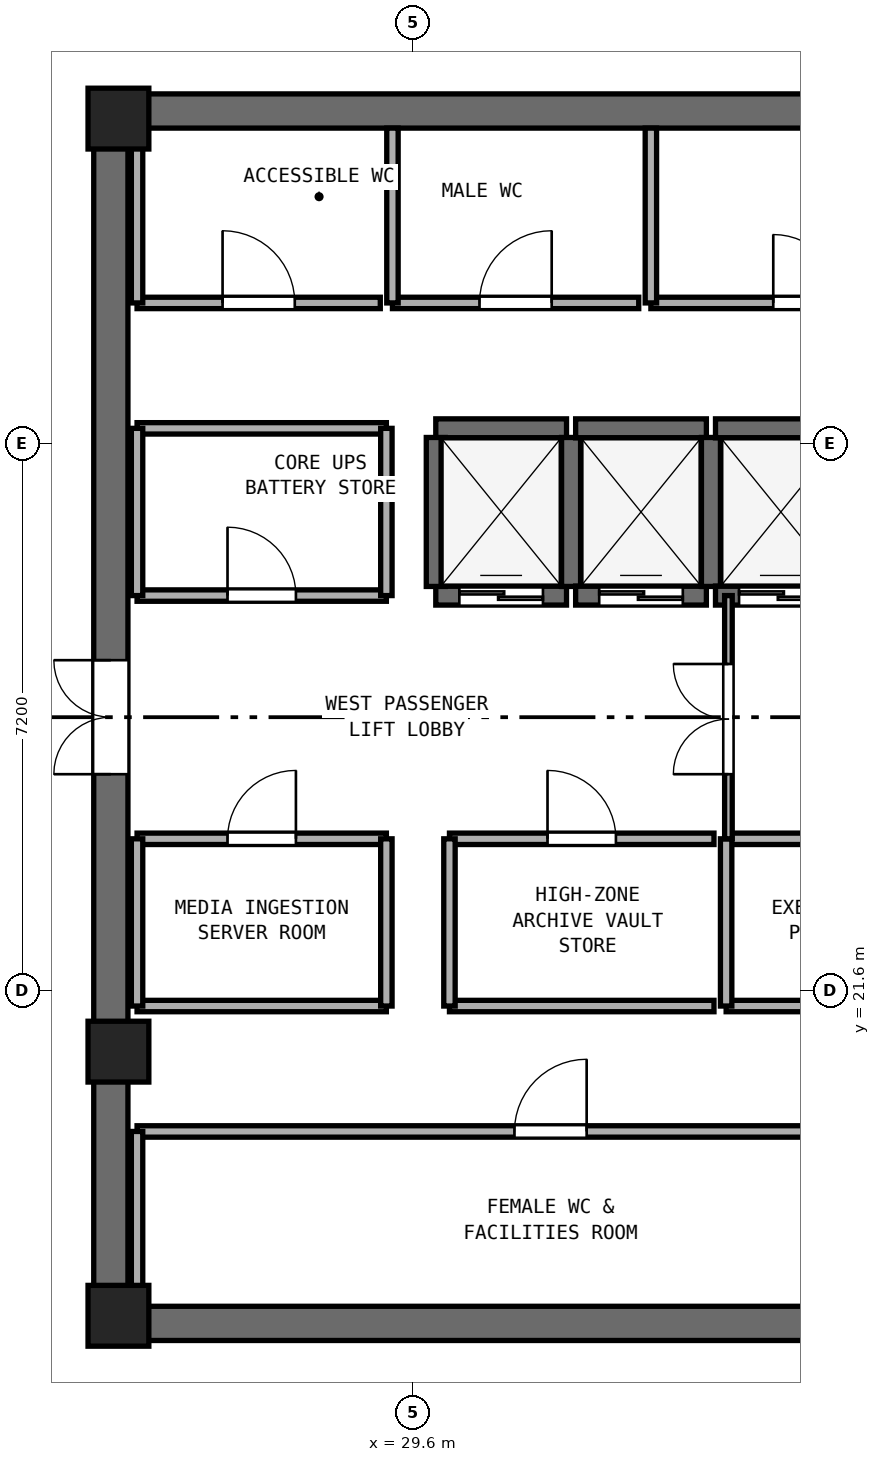
"""IFC4 building model, lengths in metres.
Left out: names, types, materials, properties, quantities, classifications, styles, units other than length and angle.
Written with IfcOpenShell. Run it as: python <this file> out.ifc"""

import sys

from ifc_helpers import new_model, si_unit, direction, frame, frame_2d, origin, origin_2d, place, context, subcontext, project, spatial, rectangle, extrude, element, fill, save


model = new_model("IFC4")
c1 = context("Model", 3, precision=1e-05, world=origin(), true_north=direction((0.0, 1.0)))
c2 = subcontext(c1, "Body", "Model", "MODEL_VIEW")
j1 = project(units=[si_unit("LENGTHUNIT", "METRE"), si_unit("PLANEANGLEUNIT", "RADIAN")], contexts=[c1])
p1 = place(None, origin())
s1 = spatial("IfcSite", under=j1, at=p1, CompositionType="ELEMENT")
p2 = place(p1, origin())
s2 = spatial("IfcBuilding", under=s1, at=p2, CompositionType="ELEMENT")
p3 = place(p2, frame((0.0, 0.0, 266.8)))
s3 = spatial("IfcBuildingStorey", under=s2, at=p3, CompositionType="ELEMENT", Elevation=266.8)
for number, where, z_axis, x_axis in (
    (1, (25.4, 17.225, 0.0), (0.0, 0.0, 1.0), (1.0, 0.0, 0.0)),
    (2, (25.4, 33.175, 0.0), (0.0, 0.0, 1.0), (1.0, 0.0, 0.0)),
):
    element("IfcWall", number, at=place(p3, frame(where, z_axis=z_axis, x_axis=x_axis)), inside=s3, PredefinedType="SHEAR", context=c2, shape_type="SweptSolid", body=[
        extrude(rectangle(XDim=23.2, YDim=0.45, at=frame_2d((11.6, 0.0))), origin(), (0.0, 0.0, 1.0), 3.51),
    ])
p4 = place(p3, frame((25.625, 17.45, 0.0), z_axis=(0.0, 0.0, 1.0), x_axis=(0.0, 1.0, 0.0)))
e3 = element("IfcWall", 3, at=p4, inside=s3, PredefinedType="SHEAR", context=c2, shape_type="SweptSolid", body=[
    extrude(rectangle(XDim=15.5, YDim=0.45, at=frame_2d((7.75, 0.0))), origin(), (0.0, 0.0, 1.0), 3.51),
])
p5 = place(p4, frame((7.0, 0.0, 0.0)))
e4 = element("IfcOpeningElement", 4, at=p5, cuts=e3, PredefinedType="OPENING", context=c2, shape_type="SweptSolid", body=[
    extrude(rectangle(XDim=1.5, YDim=2.15, at=frame_2d((0.75, 1.075))), frame((0.0, 0.235, 0.0), z_axis=(0.0, -1.0, 0.0), x_axis=(1.0, 0.0, 0.0)), (0.0, 0.0, 1.0), 0.47),
])
for number, where, z_axis, x_axis in (
    (5, (25.725, 17.325, 0.0), (0.0, 0.0, 1.0), (1.0, 0.0, 0.0)),
    (6, (25.725, 33.075, 0.0), (0.0, 0.0, 1.0), (1.0, 0.0, 0.0)),
    (7, (25.725, 20.8, 0.0), (0.0, 0.0, 1.0), (1.0, 0.0, 0.0)),
):
    element("IfcColumn", number, at=place(p3, frame(where, z_axis=z_axis, x_axis=x_axis)), inside=s3, PredefinedType="PILASTER", context=c2, shape_type="SweptSolid", body=[
        extrude(rectangle(XDim=0.8, YDim=0.8, at=origin_2d()), origin(), (0.0, 0.0, 1.0), 3.8),
    ])
p6 = place(p3, frame((29.9, 26.8, 0.0), z_axis=(0.0, 0.0, 1.0), x_axis=(1.0, 0.0, 0.0)))
e8 = element("IfcWall", 8, at=p6, inside=s3, PredefinedType="SHEAR", context=c2, shape_type="SweptSolid", body=[
    extrude(rectangle(XDim=1.72, YDim=0.25, at=frame_2d((0.86, 0.0))), origin(), (0.0, 0.0, 1.0), 3.51),
])
p7 = place(p6, frame((0.31, 0.0, 0.0)))
e9 = element("IfcOpeningElement", 9, at=p7, cuts=e8, PredefinedType="OPENING", context=c2, shape_type="SweptSolid", body=[
    extrude(rectangle(XDim=1.1, YDim=2.15, at=frame_2d((0.55, 1.075))), frame((0.0, 0.135, 0.0), z_axis=(0.0, -1.0, 0.0), x_axis=(1.0, 0.0, 0.0)), (0.0, 0.0, 1.0), 0.27),
])
p8 = place(p3, frame((29.9, 29.0, 0.0), z_axis=(0.0, 0.0, 1.0), x_axis=(1.0, 0.0, 0.0)))
e10 = element("IfcWall", 10, at=p8, inside=s3, PredefinedType="SHEAR", context=c2, shape_type="SweptSolid", body=[
    extrude(rectangle(XDim=1.72, YDim=0.25, at=frame_2d((0.86, 0.0))), origin(), (0.0, 0.0, 1.0), 3.51),
])
for number, where, z_axis, x_axis in (
    (11, (29.9, 26.92, 0.0), (0.0, 0.0, 1.0), (0.0, 1.0, 0.0)),
    (12, (31.68, 26.92, 0.0), (0.0, 0.0, 1.0), (0.0, 1.0, 0.0)),
):
    element("IfcWall", number, at=place(p3, frame(where, z_axis=z_axis, x_axis=x_axis)), inside=s3, PredefinedType="SHEAR", context=c2, shape_type="SweptSolid", body=[
        extrude(rectangle(XDim=1.96, YDim=0.25, at=frame_2d((0.98, 0.0))), origin(), (0.0, 0.0, 1.0), 3.51),
    ])
p9 = place(p3, frame((31.74, 26.8, 0.0), z_axis=(0.0, 0.0, 1.0), x_axis=(1.0, 0.0, 0.0)))
e13 = element("IfcWall", 13, at=p9, inside=s3, PredefinedType="SHEAR", context=c2, shape_type="SweptSolid", body=[
    extrude(rectangle(XDim=1.72, YDim=0.25, at=frame_2d((0.86, 0.0))), origin(), (0.0, 0.0, 1.0), 3.51),
])
p10 = place(p9, frame((0.31, 0.0, 0.0)))
e14 = element("IfcOpeningElement", 14, at=p10, cuts=e13, PredefinedType="OPENING", context=c2, shape_type="SweptSolid", body=[
    extrude(rectangle(XDim=1.1, YDim=2.15, at=frame_2d((0.55, 1.075))), frame((0.0, 0.135, 0.0), z_axis=(0.0, -1.0, 0.0), x_axis=(1.0, 0.0, 0.0)), (0.0, 0.0, 1.0), 0.27),
])
p11 = place(p3, frame((31.74, 29.0, 0.0), z_axis=(0.0, 0.0, 1.0), x_axis=(1.0, 0.0, 0.0)))
e15 = element("IfcWall", 15, at=p11, inside=s3, PredefinedType="SHEAR", context=c2, shape_type="SweptSolid", body=[
    extrude(rectangle(XDim=1.72, YDim=0.25, at=frame_2d((0.86, 0.0))), origin(), (0.0, 0.0, 1.0), 3.51),
])
p12 = place(p3, frame((33.52, 26.92, 0.0), z_axis=(0.0, 0.0, 1.0), x_axis=(0.0, 1.0, 0.0)))
e16 = element("IfcWall", 16, at=p12, inside=s3, PredefinedType="SHEAR", context=c2, shape_type="SweptSolid", body=[
    extrude(rectangle(XDim=1.96, YDim=0.25, at=frame_2d((0.98, 0.0))), origin(), (0.0, 0.0, 1.0), 3.51),
])
p13 = place(p3, frame((33.58, 26.8, 0.0), z_axis=(0.0, 0.0, 1.0), x_axis=(1.0, 0.0, 0.0)))
e17 = element("IfcWall", 17, at=p13, inside=s3, PredefinedType="SHEAR", context=c2, shape_type="SweptSolid", body=[
    extrude(rectangle(XDim=1.72, YDim=0.25, at=frame_2d((0.86, 0.0))), origin(), (0.0, 0.0, 1.0), 3.51),
])
p14 = place(p13, frame((0.31, 0.0, 0.0)))
e18 = element("IfcOpeningElement", 18, at=p14, cuts=e17, PredefinedType="OPENING", context=c2, shape_type="SweptSolid", body=[
    extrude(rectangle(XDim=1.1, YDim=2.15, at=frame_2d((0.55, 1.075))), frame((0.0, 0.135, 0.0), z_axis=(0.0, -1.0, 0.0), x_axis=(1.0, 0.0, 0.0)), (0.0, 0.0, 1.0), 0.27),
])
p15 = place(p3, frame((33.58, 29.0, 0.0), z_axis=(0.0, 0.0, 1.0), x_axis=(1.0, 0.0, 0.0)))
e19 = element("IfcWall", 19, at=p15, inside=s3, PredefinedType="SHEAR", context=c2, shape_type="SweptSolid", body=[
    extrude(rectangle(XDim=1.72, YDim=0.25, at=frame_2d((0.86, 0.0))), origin(), (0.0, 0.0, 1.0), 3.51),
])
p16 = place(p3, frame((25.97, 30.65, 0.0), z_axis=(0.0, 0.0, 1.0), x_axis=(1.0, 0.0, 0.0)))
e20 = element("IfcWall", 20, at=p16, inside=s3, PredefinedType="PARTITIONING", context=c2, shape_type="SweptSolid", body=[
    extrude(rectangle(XDim=3.2, YDim=0.15, at=frame_2d((1.6, 0.0))), origin(), (0.0, 0.0, 1.0), 3.51),
])
p17 = place(p16, frame((1.125, 0.0, 0.0)))
e21 = element("IfcOpeningElement", 21, at=p17, cuts=e20, PredefinedType="OPENING", context=c2, shape_type="SweptSolid", body=[
    extrude(rectangle(XDim=0.95, YDim=2.1, at=frame_2d((0.475, 1.05))), frame((0.0, 0.085, 0.0), z_axis=(0.0, -1.0, 0.0), x_axis=(1.0, 0.0, 0.0)), (0.0, 0.0, 1.0), 0.17),
])
p18 = place(p3, frame((25.97, 30.65, 0.0), z_axis=(0.0, 0.0, 1.0), x_axis=(0.0, 1.0, 0.0)))
e22 = element("IfcWall", 22, at=p18, inside=s3, PredefinedType="PARTITIONING", context=c2, shape_type="SweptSolid", body=[
    extrude(rectangle(XDim=2.3, YDim=0.15, at=frame_2d((1.15, 0.0))), origin(), (0.0, 0.0, 1.0), 2.61),
])
p19 = place(p3, frame((29.33, 30.65, 0.0), z_axis=(0.0, 0.0, 1.0), x_axis=(1.0, 0.0, 0.0)))
e23 = element("IfcWall", 23, at=p19, inside=s3, PredefinedType="PARTITIONING", context=c2, shape_type="SweptSolid", body=[
    extrude(rectangle(XDim=3.24, YDim=0.15, at=frame_2d((1.62, 0.0))), origin(), (0.0, 0.0, 1.0), 3.51),
])
p20 = place(p19, frame((1.145, 0.0, 0.0)))
e24 = element("IfcOpeningElement", 24, at=p20, cuts=e23, PredefinedType="OPENING", context=c2, shape_type="SweptSolid", body=[
    extrude(rectangle(XDim=0.95, YDim=2.1, at=frame_2d((0.475, 1.05))), frame((0.0, 0.085, 0.0), z_axis=(0.0, -1.0, 0.0), x_axis=(1.0, 0.0, 0.0)), (0.0, 0.0, 1.0), 0.17),
])
p21 = place(p3, frame((29.33, 30.65, 0.0), z_axis=(0.0, 0.0, 1.0), x_axis=(0.0, 1.0, 0.0)))
e25 = element("IfcWall", 25, at=p21, inside=s3, PredefinedType="PARTITIONING", context=c2, shape_type="SweptSolid", body=[
    extrude(rectangle(XDim=2.3, YDim=0.15, at=frame_2d((1.15, 0.0))), origin(), (0.0, 0.0, 1.0), 3.51),
])
p22 = place(p3, frame((32.73, 30.65, 0.0), z_axis=(0.0, 0.0, 1.0), x_axis=(1.0, 0.0, 0.0)))
e26 = element("IfcWall", 26, at=p22, inside=s3, PredefinedType="PARTITIONING", context=c2, shape_type="SweptSolid", body=[
    extrude(rectangle(XDim=4.12, YDim=0.15, at=frame_2d((2.06, 0.0))), origin(), (0.0, 0.0, 1.0), 3.51),
])
p23 = place(p22, frame((1.61, 0.0, 0.0)))
e27 = element("IfcOpeningElement", 27, at=p23, cuts=e26, PredefinedType="OPENING", context=c2, shape_type="SweptSolid", body=[
    extrude(rectangle(XDim=0.9, YDim=2.1, at=frame_2d((0.45, 1.05))), frame((0.0, 0.085, 0.0), z_axis=(0.0, -1.0, 0.0), x_axis=(1.0, 0.0, 0.0)), (0.0, 0.0, 1.0), 0.17),
])
p24 = place(p3, frame((32.73, 30.65, 0.0), z_axis=(0.0, 0.0, 1.0), x_axis=(0.0, 1.0, 0.0)))
e28 = element("IfcWall", 28, at=p24, inside=s3, PredefinedType="PARTITIONING", context=c2, shape_type="SweptSolid", body=[
    extrude(rectangle(XDim=2.3, YDim=0.15, at=frame_2d((1.15, 0.0))), origin(), (0.0, 0.0, 1.0), 3.51),
])
p25 = place(p3, frame((25.97, 19.75, 0.0), z_axis=(0.0, 0.0, 1.0), x_axis=(1.0, 0.0, 0.0)))
e29 = element("IfcWall", 29, at=p25, inside=s3, PredefinedType="PARTITIONING", context=c2, shape_type="SweptSolid", body=[
    extrude(rectangle(XDim=10.88, YDim=0.15, at=frame_2d((5.44, 0.0))), origin(), (0.0, 0.0, 1.0), 3.51),
])
p26 = place(p25, frame((4.965, 0.0, 0.0)))
e30 = element("IfcOpeningElement", 30, at=p26, cuts=e29, PredefinedType="OPENING", context=c2, shape_type="SweptSolid", body=[
    extrude(rectangle(XDim=0.95, YDim=2.1, at=frame_2d((0.475, 1.05))), frame((0.0, 0.085, 0.0), z_axis=(0.0, -1.0, 0.0), x_axis=(1.0, 0.0, 0.0)), (0.0, 0.0, 1.0), 0.17),
])
p27 = place(p3, frame((25.97, 17.45, 0.0), z_axis=(0.0, 0.0, 1.0), x_axis=(0.0, 1.0, 0.0)))
e31 = element("IfcWall", 31, at=p27, inside=s3, PredefinedType="PARTITIONING", context=c2, shape_type="SweptSolid", body=[
    extrude(rectangle(XDim=2.3, YDim=0.15, at=frame_2d((1.15, 0.0))), origin(), (0.0, 0.0, 1.0), 2.61),
])
p28 = place(p3, frame((25.97, 26.8, 0.0), z_axis=(0.0, 0.0, 1.0), x_axis=(1.0, 0.0, 0.0)))
e32 = element("IfcWall", 32, at=p28, inside=s3, PredefinedType="PARTITIONING", context=c2, shape_type="SweptSolid", body=[
    extrude(rectangle(XDim=3.28, YDim=0.15, at=frame_2d((1.64, 0.0))), origin(), (0.0, 0.0, 1.0), 3.51),
])
p29 = place(p28, frame((1.19, 0.0, 0.0)))
e33 = element("IfcOpeningElement", 33, at=p29, cuts=e32, PredefinedType="OPENING", context=c2, shape_type="SweptSolid", body=[
    extrude(rectangle(XDim=0.9, YDim=2.1, at=frame_2d((0.45, 1.05))), frame((0.0, 0.085, 0.0), z_axis=(0.0, -1.0, 0.0), x_axis=(1.0, 0.0, 0.0)), (0.0, 0.0, 1.0), 0.17),
])
p30 = place(p3, frame((25.97, 29.0, 0.0), z_axis=(0.0, 0.0, 1.0), x_axis=(1.0, 0.0, 0.0)))
e34 = element("IfcWall", 34, at=p30, inside=s3, PredefinedType="PARTITIONING", context=c2, shape_type="SweptSolid", body=[
    extrude(rectangle(XDim=3.28, YDim=0.15, at=frame_2d((1.64, 0.0))), origin(), (0.0, 0.0, 1.0), 3.51),
])
p31 = place(p3, frame((25.97, 26.8, 0.0), z_axis=(0.0, 0.0, 1.0), x_axis=(0.0, 1.0, 0.0)))
e35 = element("IfcWall", 35, at=p31, inside=s3, PredefinedType="PARTITIONING", context=c2, shape_type="SweptSolid", body=[
    extrude(rectangle(XDim=2.2, YDim=0.15, at=frame_2d((1.1, 0.0))), origin(), (0.0, 0.0, 1.0), 2.61),
])
p32 = place(p3, frame((29.25, 26.8, 0.0), z_axis=(0.0, 0.0, 1.0), x_axis=(0.0, 1.0, 0.0)))
e36 = element("IfcWall", 36, at=p32, inside=s3, PredefinedType="PARTITIONING", context=c2, shape_type="SweptSolid", body=[
    extrude(rectangle(XDim=2.2, YDim=0.15, at=frame_2d((1.1, 0.0))), origin(), (0.0, 0.0, 1.0), 3.51),
])
p33 = place(p3, frame((25.97, 21.4, 0.0), z_axis=(0.0, 0.0, 1.0), x_axis=(1.0, 0.0, 0.0)))
e37 = element("IfcWall", 37, at=p33, inside=s3, PredefinedType="PARTITIONING", context=c2, shape_type="SweptSolid", body=[
    extrude(rectangle(XDim=3.28, YDim=0.15, at=frame_2d((1.64, 0.0))), origin(), (0.0, 0.0, 1.0), 3.51),
])
p34 = place(p3, frame((25.97, 23.6, 0.0), z_axis=(0.0, 0.0, 1.0), x_axis=(1.0, 0.0, 0.0)))
e38 = element("IfcWall", 38, at=p34, inside=s3, PredefinedType="PARTITIONING", context=c2, shape_type="SweptSolid", body=[
    extrude(rectangle(XDim=3.28, YDim=0.15, at=frame_2d((1.64, 0.0))), origin(), (0.0, 0.0, 1.0), 3.51),
])
p35 = place(p34, frame((1.19, 0.0, 0.0)))
e39 = element("IfcOpeningElement", 39, at=p35, cuts=e38, PredefinedType="OPENING", context=c2, shape_type="SweptSolid", body=[
    extrude(rectangle(XDim=0.9, YDim=2.1, at=frame_2d((0.45, 1.05))), frame((0.0, 0.085, 0.0), z_axis=(0.0, -1.0, 0.0), x_axis=(1.0, 0.0, 0.0)), (0.0, 0.0, 1.0), 0.17),
])
p36 = place(p3, frame((25.97, 21.4, 0.0), z_axis=(0.0, 0.0, 1.0), x_axis=(0.0, 1.0, 0.0)))
e40 = element("IfcWall", 40, at=p36, inside=s3, PredefinedType="PARTITIONING", context=c2, shape_type="SweptSolid", body=[
    extrude(rectangle(XDim=2.2, YDim=0.15, at=frame_2d((1.1, 0.0))), origin(), (0.0, 0.0, 1.0), 2.61),
])
p37 = place(p3, frame((29.25, 21.4, 0.0), z_axis=(0.0, 0.0, 1.0), x_axis=(0.0, 1.0, 0.0)))
e41 = element("IfcWall", 41, at=p37, inside=s3, PredefinedType="PARTITIONING", context=c2, shape_type="SweptSolid", body=[
    extrude(rectangle(XDim=2.2, YDim=0.15, at=frame_2d((1.1, 0.0))), origin(), (0.0, 0.0, 1.0), 3.51),
])
p38 = place(p3, frame((30.08, 21.4, 0.0), z_axis=(0.0, 0.0, 1.0), x_axis=(1.0, 0.0, 0.0)))
e42 = element("IfcWall", 42, at=p38, inside=s3, PredefinedType="PARTITIONING", context=c2, shape_type="SweptSolid", body=[
    extrude(rectangle(XDim=3.48, YDim=0.15, at=frame_2d((1.74, 0.0))), origin(), (0.0, 0.0, 1.0), 3.51),
])
p39 = place(p3, frame((30.08, 23.6, 0.0), z_axis=(0.0, 0.0, 1.0), x_axis=(1.0, 0.0, 0.0)))
e43 = element("IfcWall", 43, at=p39, inside=s3, PredefinedType="PARTITIONING", context=c2, shape_type="SweptSolid", body=[
    extrude(rectangle(XDim=3.48, YDim=0.15, at=frame_2d((1.74, 0.0))), origin(), (0.0, 0.0, 1.0), 3.51),
])
p40 = place(p39, frame((1.29, 0.0, 0.0)))
e44 = element("IfcOpeningElement", 44, at=p40, cuts=e43, PredefinedType="OPENING", context=c2, shape_type="SweptSolid", body=[
    extrude(rectangle(XDim=0.9, YDim=2.1, at=frame_2d((0.45, 1.05))), frame((0.0, 0.085, 0.0), z_axis=(0.0, -1.0, 0.0), x_axis=(1.0, 0.0, 0.0)), (0.0, 0.0, 1.0), 0.17),
])
p41 = place(p3, frame((30.08, 21.4, 0.0), z_axis=(0.0, 0.0, 1.0), x_axis=(0.0, 1.0, 0.0)))
e45 = element("IfcWall", 45, at=p41, inside=s3, PredefinedType="PARTITIONING", context=c2, shape_type="SweptSolid", body=[
    extrude(rectangle(XDim=2.2, YDim=0.15, at=frame_2d((1.1, 0.0))), origin(), (0.0, 0.0, 1.0), 3.51),
])
p42 = place(p3, frame((33.72, 21.4, 0.0), z_axis=(0.0, 0.0, 1.0), x_axis=(1.0, 0.0, 0.0)))
e46 = element("IfcWall", 46, at=p42, inside=s3, PredefinedType="PARTITIONING", context=c2, shape_type="SweptSolid", body=[
    extrude(rectangle(XDim=3.48, YDim=0.15, at=frame_2d((1.74, 0.0))), origin(), (0.0, 0.0, 1.0), 3.51),
])
p43 = place(p3, frame((33.72, 23.6, 0.0), z_axis=(0.0, 0.0, 1.0), x_axis=(1.0, 0.0, 0.0)))
e47 = element("IfcWall", 47, at=p43, inside=s3, PredefinedType="PARTITIONING", context=c2, shape_type="SweptSolid", body=[
    extrude(rectangle(XDim=3.48, YDim=0.15, at=frame_2d((1.74, 0.0))), origin(), (0.0, 0.0, 1.0), 3.51),
])
p44 = place(p43, frame((1.29, 0.0, 0.0)))
e48 = element("IfcOpeningElement", 48, at=p44, cuts=e47, PredefinedType="OPENING", context=c2, shape_type="SweptSolid", body=[
    extrude(rectangle(XDim=0.9, YDim=2.1, at=frame_2d((0.45, 1.05))), frame((0.0, 0.085, 0.0), z_axis=(0.0, -1.0, 0.0), x_axis=(1.0, 0.0, 0.0)), (0.0, 0.0, 1.0), 0.17),
])
p45 = place(p3, frame((33.72, 21.4, 0.0), z_axis=(0.0, 0.0, 1.0), x_axis=(0.0, 1.0, 0.0)))
e49 = element("IfcWall", 49, at=p45, inside=s3, PredefinedType="PARTITIONING", context=c2, shape_type="SweptSolid", body=[
    extrude(rectangle(XDim=2.2, YDim=0.15, at=frame_2d((1.1, 0.0))), origin(), (0.0, 0.0, 1.0), 3.51),
])
p46 = place(p3, frame((33.75, 23.6, 0.0), z_axis=(0.0, 0.0, 1.0), x_axis=(0.0, 1.0, 0.0)))
e50 = element("IfcWall", 50, at=p46, inside=s3, PredefinedType="PARTITIONING", context=c2, shape_type="SweptSolid", body=[
    extrude(rectangle(XDim=3.2, YDim=0.1, at=frame_2d((1.6, 0.0))), origin(), (0.0, 0.0, 1.0), 3.51),
])
p47 = place(p46, frame((0.85, 0.0, 0.0)))
e51 = element("IfcOpeningElement", 51, at=p47, cuts=e50, PredefinedType="OPENING", context=c2, shape_type="SweptSolid", body=[
    extrude(rectangle(XDim=1.45, YDim=2.12, at=frame_2d((0.725, 1.06))), frame((0.0, 0.06, 0.0), z_axis=(0.0, -1.0, 0.0), x_axis=(1.0, 0.0, 0.0)), (0.0, 0.0, 1.0), 0.12),
])
p48 = place(p7, origin())
e52 = element("IfcDoor", 52, at=p48, inside=s3, OperationType="DOUBLE_DOOR_SLIDING", PredefinedType="DOOR", context=c2, shape_type="SweptSolid", body=[
    extrude(rectangle(XDim=1.1, YDim=2.15, at=frame_2d((0.55, 1.075))), frame((0.0, 0.025, 0.0), z_axis=(0.0, -1.0, 0.0), x_axis=(1.0, 0.0, 0.0)), (0.0, 0.0, 1.0), 0.05),
])
fill(e9, e52)
p49 = place(p10, origin())
e53 = element("IfcDoor", 53, at=p49, inside=s3, OperationType="DOUBLE_DOOR_SLIDING", PredefinedType="DOOR", context=c2, shape_type="SweptSolid", body=[
    extrude(rectangle(XDim=1.1, YDim=2.15, at=frame_2d((0.55, 1.075))), frame((0.0, 0.025, 0.0), z_axis=(0.0, -1.0, 0.0), x_axis=(1.0, 0.0, 0.0)), (0.0, 0.0, 1.0), 0.05),
])
fill(e14, e53)
p50 = place(p14, origin())
e54 = element("IfcDoor", 54, at=p50, inside=s3, OperationType="DOUBLE_DOOR_SLIDING", PredefinedType="DOOR", context=c2, shape_type="SweptSolid", body=[
    extrude(rectangle(XDim=1.1, YDim=2.15, at=frame_2d((0.55, 1.075))), frame((0.0, 0.025, 0.0), z_axis=(0.0, -1.0, 0.0), x_axis=(1.0, 0.0, 0.0)), (0.0, 0.0, 1.0), 0.05),
])
fill(e18, e54)
p51 = place(p5, origin())
e55 = element("IfcDoor", 55, at=p51, inside=s3, OperationType="DOUBLE_DOOR_SINGLE_SWING", PredefinedType="DOOR", context=c2, shape_type="SweptSolid", body=[
    extrude(rectangle(XDim=1.5, YDim=2.15, at=frame_2d((0.75, 1.075))), frame((0.0, 0.025, 0.0), z_axis=(0.0, -1.0, 0.0), x_axis=(1.0, 0.0, 0.0)), (0.0, 0.0, 1.0), 0.05),
])
fill(e4, e55)
p52 = place(p17, origin())
e56 = element("IfcDoor", 56, at=p52, inside=s3, OperationType="SINGLE_SWING_LEFT", PredefinedType="DOOR", context=c2, shape_type="SweptSolid", body=[
    extrude(rectangle(XDim=0.95, YDim=2.1, at=frame_2d((0.475, 1.05))), frame((0.0, 0.025, 0.0), z_axis=(0.0, -1.0, 0.0), x_axis=(1.0, 0.0, 0.0)), (0.0, 0.0, 1.0), 0.05),
])
fill(e21, e56)
p53 = place(p20, origin())
e57 = element("IfcDoor", 57, at=p53, inside=s3, OperationType="SINGLE_SWING_RIGHT", PredefinedType="DOOR", context=c2, shape_type="SweptSolid", body=[
    extrude(rectangle(XDim=0.95, YDim=2.1, at=frame_2d((0.475, 1.05))), frame((0.0, 0.025, 0.0), z_axis=(0.0, -1.0, 0.0), x_axis=(1.0, 0.0, 0.0)), (0.0, 0.0, 1.0), 0.05),
])
fill(e24, e57)
p54 = place(p23, origin())
e58 = element("IfcDoor", 58, at=p54, inside=s3, OperationType="SINGLE_SWING_LEFT", PredefinedType="DOOR", context=c2, shape_type="SweptSolid", body=[
    extrude(rectangle(XDim=0.9, YDim=2.1, at=frame_2d((0.45, 1.05))), frame((0.0, 0.025, 0.0), z_axis=(0.0, -1.0, 0.0), x_axis=(1.0, 0.0, 0.0)), (0.0, 0.0, 1.0), 0.05),
])
fill(e27, e58)
p55 = place(p26, origin())
e59 = element("IfcDoor", 59, at=p55, inside=s3, OperationType="SINGLE_SWING_RIGHT", PredefinedType="DOOR", context=c2, shape_type="SweptSolid", body=[
    extrude(rectangle(XDim=0.95, YDim=2.1, at=frame_2d((0.475, 1.05))), frame((0.0, 0.025, 0.0), z_axis=(0.0, -1.0, 0.0), x_axis=(1.0, 0.0, 0.0)), (0.0, 0.0, 1.0), 0.05),
])
fill(e30, e59)
p56 = place(p29, origin())
e60 = element("IfcDoor", 60, at=p56, inside=s3, OperationType="SINGLE_SWING_LEFT", PredefinedType="DOOR", context=c2, shape_type="SweptSolid", body=[
    extrude(rectangle(XDim=0.9, YDim=2.1, at=frame_2d((0.45, 1.05))), frame((0.0, 0.025, 0.0), z_axis=(0.0, -1.0, 0.0), x_axis=(1.0, 0.0, 0.0)), (0.0, 0.0, 1.0), 0.05),
])
fill(e33, e60)
p57 = place(p35, origin())
e61 = element("IfcDoor", 61, at=p57, inside=s3, OperationType="SINGLE_SWING_RIGHT", PredefinedType="DOOR", context=c2, shape_type="SweptSolid", body=[
    extrude(rectangle(XDim=0.9, YDim=2.1, at=frame_2d((0.45, 1.05))), frame((0.0, 0.025, 0.0), z_axis=(0.0, -1.0, 0.0), x_axis=(1.0, 0.0, 0.0)), (0.0, 0.0, 1.0), 0.05),
])
fill(e39, e61)
p58 = place(p40, origin())
e62 = element("IfcDoor", 62, at=p58, inside=s3, OperationType="SINGLE_SWING_LEFT", PredefinedType="DOOR", context=c2, shape_type="SweptSolid", body=[
    extrude(rectangle(XDim=0.9, YDim=2.1, at=frame_2d((0.45, 1.05))), frame((0.0, 0.025, 0.0), z_axis=(0.0, -1.0, 0.0), x_axis=(1.0, 0.0, 0.0)), (0.0, 0.0, 1.0), 0.05),
])
fill(e44, e62)
p59 = place(p47, origin())
e63 = element("IfcDoor", 63, at=p59, inside=s3, OperationType="DOUBLE_DOOR_SINGLE_SWING", PredefinedType="DOOR", context=c2, shape_type="SweptSolid", body=[
    extrude(rectangle(XDim=1.45, YDim=2.12, at=frame_2d((0.725, 1.06))), frame((0.0, 0.025, 0.0), z_axis=(0.0, -1.0, 0.0), x_axis=(1.0, 0.0, 0.0)), (0.0, 0.0, 1.0), 0.05),
])
fill(e51, e63)
save(model, sys.argv[1])
